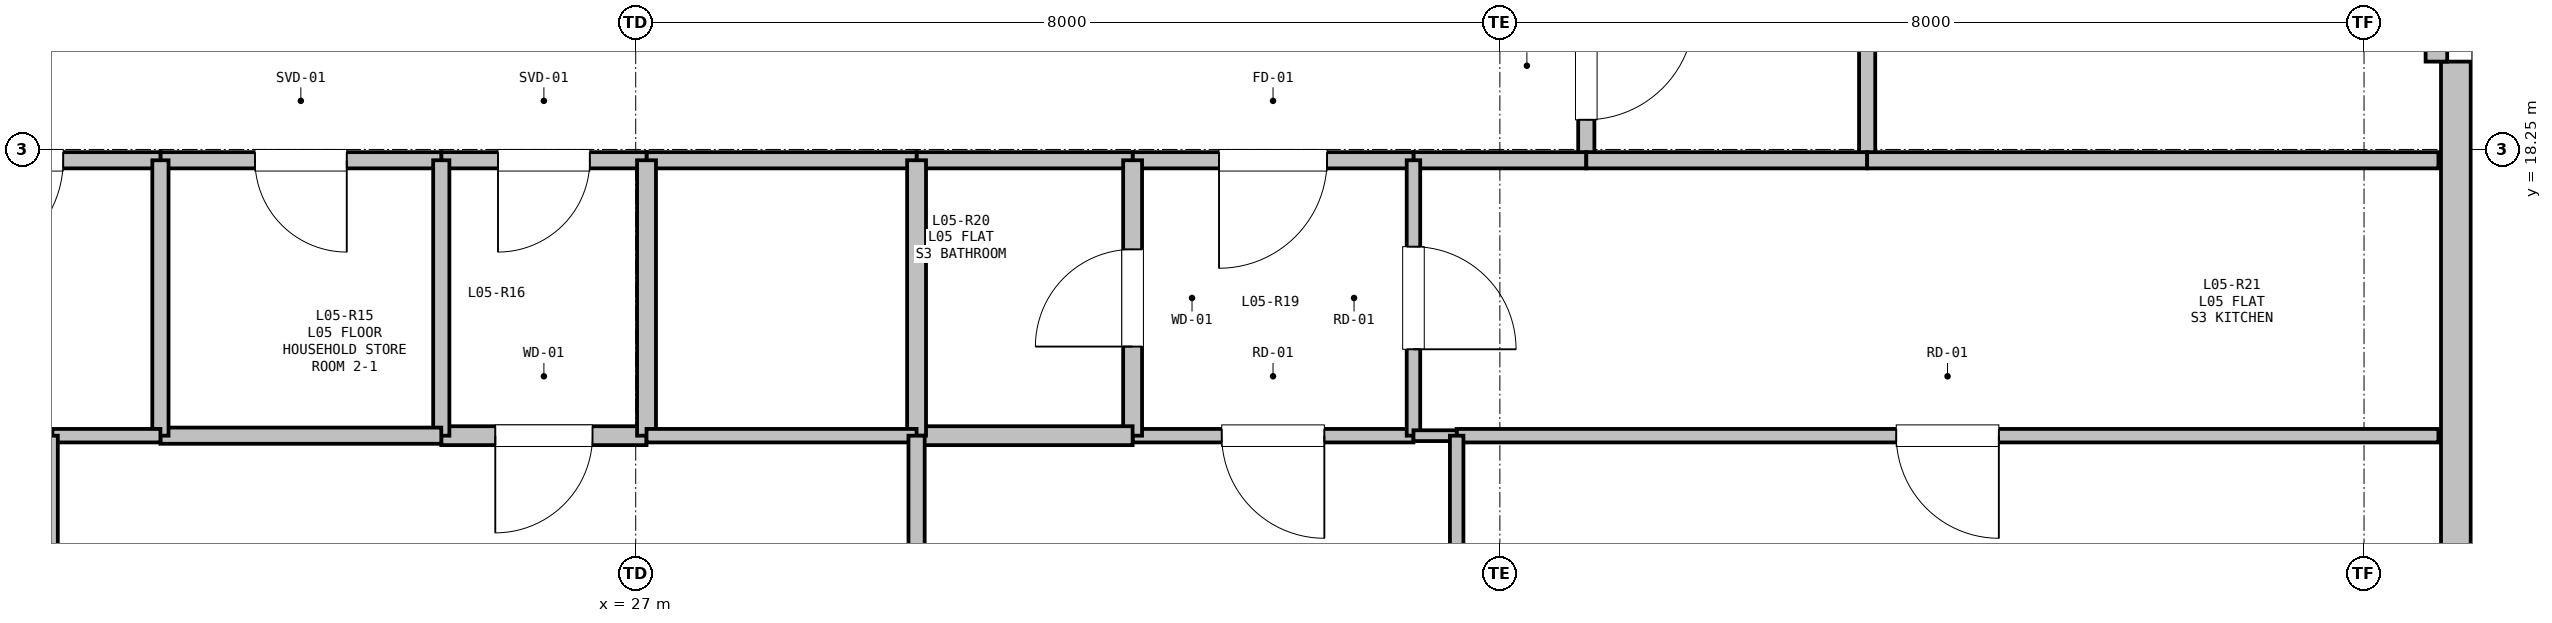
"""IFC4 building model, lengths in metres.
Left out: names, types, materials, properties, quantities, classifications, styles, units other than length and angle.
Written with IfcOpenShell. Run it as: python <this file> out.ifc"""

import sys

from ifc_helpers import new_model, si_unit, direction, frame, frame_2d, origin, place, context, subcontext, project, spatial, rectangle, extrude, element, fill, save


model = new_model("IFC4")
c1 = context("Model", 3, precision=1e-05, world=origin(), true_north=direction((0.0, 1.0)))
c2 = subcontext(c1, "Body", "Model", "MODEL_VIEW")
j1 = project(units=[si_unit("LENGTHUNIT", "METRE"), si_unit("PLANEANGLEUNIT", "RADIAN")], contexts=[c1])
p1 = place(None, origin())
s1 = spatial("IfcSite", under=j1, at=p1, CompositionType="ELEMENT")
p2 = place(p1, origin())
s2 = spatial("IfcBuilding", under=s1, at=p2, CompositionType="ELEMENT")
p3 = place(p2, frame((0.0, 0.0, 22.5)))
s3 = spatial("IfcBuildingStorey", under=s2, at=p3, CompositionType="ELEMENT", Elevation=22.5)
p4 = place(p3, frame((43.85, 19.063, 0.0), z_axis=(0.0, 0.0, 1.0), x_axis=(0.0, -1.0, 0.0)))
e1 = element("IfcWall", 1, at=p4, inside=s3, PredefinedType="SOLIDWALL", context=c2, shape_type="SweptSolid", body=[
    extrude(rectangle(XDim=12.673, YDim=0.275, at=frame_2d((6.336, 0.0))), origin(), (0.0, 0.0, 1.0), 2.66),
])
p5 = place(p3, frame((43.67, 20.763, 0.0), z_axis=(0.0, 0.0, 1.0), x_axis=(0.0, -1.0, 0.0)))
e2 = element("IfcWall", 2, at=p5, inside=s3, PredefinedType="PARAPET", context=c2, shape_type="SweptSolid", body=[
    extrude(rectangle(XDim=1.7, YDim=0.2, at=frame_2d((0.85, 0.0))), origin(), (0.0, 0.0, 1.0), 2.66),
])
p6 = place(p3, frame((26.76, 10.896, 0.0), z_axis=(0.0, 0.0, 1.0), x_axis=(-0.866027351828, 0.499996625875, 0.0)))
e3 = element("IfcWall", 3, at=p6, inside=s3, PredefinedType="PARAPET", context=c2, shape_type="SweptSolid", body=[
    extrude(rectangle(XDim=11.973, YDim=0.2, at=frame_2d((5.987, 0.0))), origin(), (0.0, 0.0, 1.0), 0.2),
])
p7 = place(p3, frame((35.8, 19.9, 0.0), z_axis=(0.0, 0.0, 1.0), x_axis=(0.0, -1.0, 0.0)))
e4 = element("IfcWall", 4, at=p7, inside=s3, PredefinedType="PARTITIONING", context=c2, shape_type="SweptSolid", body=[
    extrude(rectangle(XDim=1.75, YDim=0.15, at=frame_2d((0.875, 0.0))), origin(), (0.0, 0.0, 1.0), 3.04),
])
p8 = place(p7, frame((0.375, 0.0, 0.0)))
e5 = element("IfcOpeningElement", 5, at=p8, cuts=e4, PredefinedType="OPENING", context=c2, shape_type="SweptSolid", body=[
    extrude(rectangle(XDim=1.0, YDim=2.15, at=frame_2d((0.5, 1.075))), frame((0.0, 0.085, 0.0), z_axis=(0.0, -1.0, 0.0), x_axis=(1.0, 0.0, 0.0)), (0.0, 0.0, 1.0), 0.17),
])
p9 = place(p3, frame((35.8, 18.15, 0.0), z_axis=(0.0, 0.0, 1.0), x_axis=(-1.0, 0.0, 0.0)))
e6 = element("IfcWall", 6, at=p9, inside=s3, PredefinedType="PARTITIONING", context=c2, shape_type="SweptSolid", body=[
    extrude(rectangle(XDim=1.6, YDim=0.15, at=frame_2d((0.8, 0.0))), origin(), (0.0, 0.0, 1.0), 3.04),
])
p10 = place(p3, frame((34.2, 18.15, 0.0), z_axis=(0.0, 0.0, 1.0), x_axis=(-1.0, 0.0, 0.0)))
e7 = element("IfcWall", 7, at=p10, inside=s3, PredefinedType="PARTITIONING", context=c2, shape_type="SweptSolid", body=[
    extrude(rectangle(XDim=2.6, YDim=0.15, at=frame_2d((1.3, 0.0))), origin(), (0.0, 0.0, 1.0), 3.04),
])
p11 = place(p10, frame((0.8, 0.0, 0.0)))
e8 = element("IfcOpeningElement", 8, at=p11, cuts=e7, PredefinedType="OPENING", context=c2, shape_type="SweptSolid", body=[
    extrude(rectangle(XDim=1.0, YDim=2.15, at=frame_2d((0.5, 1.075))), frame((0.0, 0.085, 0.0), z_axis=(0.0, -1.0, 0.0), x_axis=(1.0, 0.0, 0.0)), (0.0, 0.0, 1.0), 0.17),
])
p12 = place(p3, frame((31.6, 18.15, 0.0), z_axis=(0.0, 0.0, 1.0), x_axis=(-1.0, 0.0, 0.0)))
e9 = element("IfcWall", 9, at=p12, inside=s3, PredefinedType="PARTITIONING", context=c2, shape_type="SweptSolid", body=[
    extrude(rectangle(XDim=2.0, YDim=0.15, at=frame_2d((1.0, 0.0))), origin(), (0.0, 0.0, 1.0), 3.04),
])
p13 = place(p3, frame((29.6, 18.15, 0.0), z_axis=(0.0, 0.0, 1.0), x_axis=(-1.0, 0.0, 0.0)))
e10 = element("IfcWall", 10, at=p13, inside=s3, PredefinedType="PARTITIONING", context=c2, shape_type="SweptSolid", body=[
    extrude(rectangle(XDim=2.5, YDim=0.15, at=frame_2d((1.25, 0.0))), origin(), (0.0, 0.0, 1.0), 3.04),
])
p14 = place(p3, frame((27.1, 18.15, 0.0), z_axis=(0.0, 0.0, 1.0), x_axis=(-1.0, 0.0, 0.0)))
e11 = element("IfcWall", 11, at=p14, inside=s3, PredefinedType="PARTITIONING", context=c2, shape_type="SweptSolid", body=[
    extrude(rectangle(XDim=1.9, YDim=0.15, at=frame_2d((0.95, 0.0))), origin(), (0.0, 0.0, 1.0), 3.04),
])
p15 = place(p14, frame((0.525, 0.0, 0.0)))
e12 = element("IfcOpeningElement", 12, at=p15, cuts=e11, PredefinedType="OPENING", context=c2, shape_type="SweptSolid", body=[
    extrude(rectangle(XDim=0.85, YDim=2.1, at=frame_2d((0.425, 1.05))), frame((0.0, 0.085, 0.0), z_axis=(0.0, -1.0, 0.0), x_axis=(1.0, 0.0, 0.0)), (0.0, 0.0, 1.0), 0.17),
])
p16 = place(p3, frame((25.2, 18.15, 0.0), z_axis=(0.0, 0.0, 1.0), x_axis=(-1.0, 0.0, 0.0)))
e13 = element("IfcWall", 13, at=p16, inside=s3, PredefinedType="PARTITIONING", context=c2, shape_type="SweptSolid", body=[
    extrude(rectangle(XDim=2.6, YDim=0.15, at=frame_2d((1.3, 0.0))), origin(), (0.0, 0.0, 1.0), 2.337),
])
p17 = place(p16, frame((0.875, 0.0, 0.0)))
e14 = element("IfcOpeningElement", 14, at=p17, cuts=e13, PredefinedType="OPENING", context=c2, shape_type="SweptSolid", body=[
    extrude(rectangle(XDim=0.85, YDim=2.1, at=frame_2d((0.425, 1.05))), frame((0.0, 0.085, 0.0), z_axis=(0.0, -1.0, 0.0), x_axis=(1.0, 0.0, 0.0)), (0.0, 0.0, 1.0), 0.17),
])
p18 = place(p3, frame((22.6, 18.15, 0.0), z_axis=(0.0, 0.0, 1.0), x_axis=(-1.0, 0.0, 0.0)))
e15 = element("IfcWall", 15, at=p18, inside=s3, PredefinedType="PARTITIONING", context=c2, shape_type="SweptSolid", body=[
    extrude(rectangle(XDim=2.8, YDim=0.15, at=frame_2d((1.4, 0.0))), origin(), (0.0, 0.0, 1.0), 3.04),
])
p19 = place(p18, frame((0.9, 0.0, 0.0)))
e16 = element("IfcOpeningElement", 16, at=p19, cuts=e15, PredefinedType="OPENING", context=c2, shape_type="SweptSolid", body=[
    extrude(rectangle(XDim=1.0, YDim=2.15, at=frame_2d((0.5, 1.075))), frame((0.0, 0.085, 0.0), z_axis=(0.0, -1.0, 0.0), x_axis=(1.0, 0.0, 0.0)), (0.0, 0.0, 1.0), 0.17),
])
p20 = place(p3, frame((38.4, 21.4, 0.0), z_axis=(0.0, 0.0, 1.0), x_axis=(0.0, -1.0, 0.0)))
e17 = element("IfcWall", 17, at=p20, inside=s3, PredefinedType="PARTITIONING", context=c2, shape_type="SweptSolid", body=[
    extrude(rectangle(XDim=3.25, YDim=0.15, at=frame_2d((1.625, 0.0))), origin(), (0.0, 0.0, 1.0), 3.04),
])
p21 = place(p3, frame((38.4, 18.15, 0.0), z_axis=(0.0, 0.0, 1.0), x_axis=(-1.0, 0.0, 0.0)))
e18 = element("IfcWall", 18, at=p21, inside=s3, PredefinedType="PARTITIONING", context=c2, shape_type="SweptSolid", body=[
    extrude(rectangle(XDim=2.6, YDim=0.15, at=frame_2d((1.3, 0.0))), origin(), (0.0, 0.0, 1.0), 2.337),
])
p22 = place(p3, frame((34.2, 15.6, 0.0), z_axis=(0.0, 0.0, 1.0), x_axis=(-1.0, 0.0, 0.0)))
e19 = element("IfcWall", 19, at=p22, inside=s3, PredefinedType="PARTITIONING", context=c2, shape_type="SweptSolid", body=[
    extrude(rectangle(XDim=2.6, YDim=0.125, at=frame_2d((1.3, 0.0))), origin(), (0.0, 0.0, 1.0), 3.04),
])
p23 = place(p22, frame((0.825, 0.0, 0.0)))
e20 = element("IfcOpeningElement", 20, at=p23, cuts=e19, PredefinedType="OPENING", context=c2, shape_type="SweptSolid", body=[
    extrude(rectangle(XDim=0.95, YDim=2.1, at=frame_2d((0.475, 1.05))), frame((0.0, 0.073, 0.0), z_axis=(0.0, -1.0, 0.0), x_axis=(1.0, 0.0, 0.0)), (0.0, 0.0, 1.0), 0.145),
])
p24 = place(p3, frame((31.6, 15.6, 0.0), z_axis=(0.0, 0.0, 1.0), x_axis=(0.0, 1.0, 0.0)))
e21 = element("IfcWall", 21, at=p24, inside=s3, PredefinedType="PLUMBINGWALL", context=c2, shape_type="SweptSolid", body=[
    extrude(rectangle(XDim=2.55, YDim=0.175, at=frame_2d((1.275, 0.0))), origin(), (0.0, 0.0, 1.0), 3.04),
])
p25 = place(p24, frame((0.825, 0.0, 0.0)))
e22 = element("IfcOpeningElement", 22, at=p25, cuts=e21, PredefinedType="OPENING", context=c2, shape_type="SweptSolid", body=[
    extrude(rectangle(XDim=0.9, YDim=2.1, at=frame_2d((0.45, 1.05))), frame((0.0, 0.097, 0.0), z_axis=(0.0, -1.0, 0.0), x_axis=(1.0, 0.0, 0.0)), (0.0, 0.0, 1.0), 0.195),
])
p26 = place(p3, frame((34.2, 18.15, 0.0), z_axis=(0.0, 0.0, 1.0), x_axis=(0.0, -1.0, 0.0)))
e23 = element("IfcWall", 23, at=p26, inside=s3, PredefinedType="PARTITIONING", context=c2, shape_type="SweptSolid", body=[
    extrude(rectangle(XDim=2.55, YDim=0.125, at=frame_2d((1.275, 0.0))), origin(), (0.0, 0.0, 1.0), 3.04),
])
p27 = place(p26, frame((0.8, 0.0, 0.0)))
e24 = element("IfcOpeningElement", 24, at=p27, cuts=e23, PredefinedType="OPENING", context=c2, shape_type="SweptSolid", body=[
    extrude(rectangle(XDim=0.95, YDim=2.1, at=frame_2d((0.475, 1.05))), frame((0.0, 0.073, 0.0), z_axis=(0.0, -1.0, 0.0), x_axis=(1.0, 0.0, 0.0)), (0.0, 0.0, 1.0), 0.145),
])
p28 = place(p3, frame((27.1, 15.6, 0.0), z_axis=(0.0, 0.0, 1.0), x_axis=(-1.0, 0.0, 0.0)))
e25 = element("IfcWall", 25, at=p28, inside=s3, PredefinedType="PLUMBINGWALL", context=c2, shape_type="SweptSolid", body=[
    extrude(rectangle(XDim=1.9, YDim=0.175, at=frame_2d((0.95, 0.0))), origin(), (0.0, 0.0, 1.0), 2.337),
])
p29 = place(p28, frame((0.5, 0.0, 0.0)))
e26 = element("IfcOpeningElement", 26, at=p29, cuts=e25, PredefinedType="OPENING", context=c2, shape_type="SweptSolid", body=[
    extrude(rectangle(XDim=0.9, YDim=2.1, at=frame_2d((0.45, 1.05))), frame((0.0, 0.097, 0.0), z_axis=(0.0, -1.0, 0.0), x_axis=(1.0, 0.0, 0.0)), (0.0, 0.0, 1.0), 0.195),
])
p30 = place(p3, frame((25.2, 15.6, 0.0), z_axis=(0.0, 0.0, 1.0), x_axis=(0.0, 1.0, 0.0)))
e27 = element("IfcWall", 27, at=p30, inside=s3, PredefinedType="PARTITIONING", context=c2, shape_type="SweptSolid", body=[
    extrude(rectangle(XDim=2.55, YDim=0.15, at=frame_2d((1.275, 0.0))), origin(), (0.0, 0.0, 1.0), 2.337),
])
p31 = place(p3, frame((27.1, 18.15, 0.0), z_axis=(0.0, 0.0, 1.0), x_axis=(0.0, -1.0, 0.0)))
e28 = element("IfcWall", 28, at=p31, inside=s3, PredefinedType="PLUMBINGWALL", context=c2, shape_type="SweptSolid", body=[
    extrude(rectangle(XDim=2.55, YDim=0.175, at=frame_2d((1.275, 0.0))), origin(), (0.0, 0.0, 1.0), 3.04),
])
p32 = place(p3, frame((31.6, 15.6, 0.0), z_axis=(0.0, 0.0, 1.0), x_axis=(-1.0, 0.0, 0.0)))
e29 = element("IfcWall", 29, at=p32, inside=s3, PredefinedType="PLUMBINGWALL", context=c2, shape_type="SweptSolid", body=[
    extrude(rectangle(XDim=2.0, YDim=0.175, at=frame_2d((1.0, 0.0))), origin(), (0.0, 0.0, 1.0), 3.04),
])
p33 = place(p3, frame((29.6, 15.6, 0.0), z_axis=(0.0, 0.0, 1.0), x_axis=(0.0, 1.0, 0.0)))
e30 = element("IfcWall", 30, at=p33, inside=s3, PredefinedType="PLUMBINGWALL", context=c2, shape_type="SweptSolid", body=[
    extrude(rectangle(XDim=2.55, YDim=0.175, at=frame_2d((1.275, 0.0))), origin(), (0.0, 0.0, 1.0), 3.04),
])
p34 = place(p3, frame((38.4, 18.15, 0.0), z_axis=(0.0, 0.0, 1.0), x_axis=(1.0, 0.0, 0.0)))
e31 = element("IfcWall", 31, at=p34, inside=s3, PredefinedType="PARTITIONING", context=c2, shape_type="SweptSolid", body=[
    extrude(rectangle(XDim=5.289, YDim=0.15, at=frame_2d((2.644, 0.0))), origin(), (0.0, 0.0, 1.0), 2.365),
])
p35 = place(p3, frame((43.688, 15.6, 0.0), z_axis=(0.0, 0.0, 1.0), x_axis=(-1.0, 0.0, 0.0)))
e32 = element("IfcWall", 32, at=p35, inside=s3, PredefinedType="PARTITIONING", context=c2, shape_type="SweptSolid", body=[
    extrude(rectangle(XDim=9.088, YDim=0.125, at=frame_2d((4.544, 0.0))), origin(), (0.0, 0.0, 1.0), 2.337),
])
p36 = place(p35, frame((4.069, 0.0, 0.0)))
e33 = element("IfcOpeningElement", 33, at=p36, cuts=e32, PredefinedType="OPENING", context=c2, shape_type="SweptSolid", body=[
    extrude(rectangle(XDim=0.95, YDim=2.1, at=frame_2d((0.475, 1.05))), frame((0.0, 0.073, 0.0), z_axis=(0.0, -1.0, 0.0), x_axis=(1.0, 0.0, 0.0)), (0.0, 0.0, 1.0), 0.145),
])
p37 = place(p3, frame((34.6, 15.6, 0.0), z_axis=(0.0, 0.0, 1.0), x_axis=(-1.0, 0.0, 0.0)))
e34 = element("IfcWall", 34, at=p37, inside=s3, PredefinedType="PARTITIONING", context=c2, shape_type="SweptSolid", body=[
    extrude(rectangle(XDim=0.4, YDim=0.1, at=frame_2d((0.2, 0.0))), origin(), (0.0, 0.0, 1.0), 3.04),
])
p38 = place(p3, frame((25.2, 15.6, 0.0), z_axis=(0.0, 0.0, 1.0), x_axis=(-1.0, 0.0, 0.0)))
e35 = element("IfcWall", 35, at=p38, inside=s3, PredefinedType="PARTITIONING", context=c2, shape_type="SweptSolid", body=[
    extrude(rectangle(XDim=2.6, YDim=0.15, at=frame_2d((1.3, 0.0))), origin(), (0.0, 0.0, 1.0), 3.04),
])
p39 = place(p3, frame((22.6, 15.6, 0.0), z_axis=(0.0, 0.0, 1.0), x_axis=(0.0, 1.0, 0.0)))
e36 = element("IfcWall", 36, at=p39, inside=s3, PredefinedType="PARTITIONING", context=c2, shape_type="SweptSolid", body=[
    extrude(rectangle(XDim=2.55, YDim=0.15, at=frame_2d((1.275, 0.0))), origin(), (0.0, 0.0, 1.0), 3.04),
])
p40 = place(p3, frame((22.6, 15.6, 0.0), z_axis=(0.0, 0.0, 1.0), x_axis=(-1.0, 0.0, 0.0)))
e37 = element("IfcWall", 37, at=p40, inside=s3, PredefinedType="PARTITIONING", context=c2, shape_type="SweptSolid", body=[
    extrude(rectangle(XDim=1.0, YDim=0.125, at=frame_2d((0.5, 0.0))), origin(), (0.0, 0.0, 1.0), 3.04),
])
p41 = place(p3, frame((21.6, 15.6, 0.0), z_axis=(0.0, 0.0, 1.0), x_axis=(0.0, -1.0, 0.0)))
e38 = element("IfcWall", 38, at=p41, inside=s3, PredefinedType="PARTITIONING", context=c2, shape_type="SweptSolid", body=[
    extrude(rectangle(XDim=1.684, YDim=0.1, at=frame_2d((0.842, 0.0))), origin(), (0.0, 0.0, 1.0), 2.365),
])
p42 = place(p3, frame((27.1, 15.6, 0.0), z_axis=(0.0, 0.0, 1.0), x_axis=(1.0, 0.0, 0.0)))
e39 = element("IfcWall", 39, at=p42, inside=s3, PredefinedType="PARTITIONING", context=c2, shape_type="SweptSolid", body=[
    extrude(rectangle(XDim=2.5, YDim=0.125, at=frame_2d((1.25, 0.0))), origin(), (0.0, 0.0, 1.0), 3.04),
])
p43 = place(p3, frame((29.6, 15.6, 0.0), z_axis=(0.0, 0.0, 1.0), x_axis=(0.0, -1.0, 0.0)))
e40 = element("IfcWall", 40, at=p43, inside=s3, PredefinedType="PARTITIONING", context=c2, shape_type="SweptSolid", body=[
    extrude(rectangle(XDim=6.157, YDim=0.15, at=frame_2d((3.079, 0.0))), origin(), (0.0, 0.0, 1.0), 2.337),
])
p44 = place(p3, frame((34.6, 15.6, 0.0), z_axis=(0.0, 0.0, 1.0), x_axis=(0.0, -1.0, 0.0)))
e41 = element("IfcWall", 41, at=p44, inside=s3, PredefinedType="PARTITIONING", context=c2, shape_type="SweptSolid", body=[
    extrude(rectangle(XDim=5.98, YDim=0.125, at=frame_2d((2.99, 0.0))), origin(), (0.0, 0.0, 1.0), 3.04),
])
p45 = place(p44, frame((2.515, 0.0, 0.0)))
e42 = element("IfcOpeningElement", 42, at=p45, cuts=e41, PredefinedType="OPENING", context=c2, shape_type="SweptSolid", body=[
    extrude(rectangle(XDim=0.95, YDim=2.1, at=frame_2d((0.475, 1.05))), frame((0.0, 0.073, 0.0), z_axis=(0.0, -1.0, 0.0), x_axis=(1.0, 0.0, 0.0)), (0.0, 0.0, 1.0), 0.145),
])
p46 = place(p8, origin())
e43 = element("IfcDoor", 43, at=p46, inside=s3, OperationType="SINGLE_SWING_LEFT", PredefinedType="DOOR", context=c2, shape_type="SweptSolid", body=[
    extrude(rectangle(XDim=1.0, YDim=2.15, at=frame_2d((0.5, 1.075))), frame((0.0, 0.025, 0.0), z_axis=(0.0, -1.0, 0.0), x_axis=(1.0, 0.0, 0.0)), (0.0, 0.0, 1.0), 0.05),
])
fill(e5, e43)
p47 = place(p11, origin())
e44 = element("IfcDoor", 44, at=p47, inside=s3, OperationType="SINGLE_SWING_RIGHT", PredefinedType="DOOR", context=c2, shape_type="SweptSolid", body=[
    extrude(rectangle(XDim=1.0, YDim=2.15, at=frame_2d((0.5, 1.075))), frame((0.0, 0.025, 0.0), z_axis=(0.0, -1.0, 0.0), x_axis=(1.0, 0.0, 0.0)), (0.0, 0.0, 1.0), 0.05),
])
fill(e8, e44)
p48 = place(p15, origin())
e45 = element("IfcDoor", 45, at=p48, inside=s3, OperationType="SINGLE_SWING_RIGHT", PredefinedType="DOOR", context=c2, shape_type="SweptSolid", body=[
    extrude(rectangle(XDim=0.85, YDim=2.1, at=frame_2d((0.425, 1.05))), frame((0.0, 0.025, 0.0), z_axis=(0.0, -1.0, 0.0), x_axis=(1.0, 0.0, 0.0)), (0.0, 0.0, 1.0), 0.05),
])
fill(e12, e45)
p49 = place(p17, origin())
e46 = element("IfcDoor", 46, at=p49, inside=s3, OperationType="SINGLE_SWING_LEFT", PredefinedType="DOOR", context=c2, shape_type="SweptSolid", body=[
    extrude(rectangle(XDim=0.85, YDim=2.1, at=frame_2d((0.425, 1.05))), frame((0.0, 0.025, 0.0), z_axis=(0.0, -1.0, 0.0), x_axis=(1.0, 0.0, 0.0)), (0.0, 0.0, 1.0), 0.05),
])
fill(e14, e46)
p50 = place(p19, origin())
e47 = element("IfcDoor", 47, at=p50, inside=s3, OperationType="SINGLE_SWING_RIGHT", PredefinedType="DOOR", context=c2, shape_type="SweptSolid", body=[
    extrude(rectangle(XDim=1.0, YDim=2.15, at=frame_2d((0.5, 1.075))), frame((0.0, 0.025, 0.0), z_axis=(0.0, -1.0, 0.0), x_axis=(1.0, 0.0, 0.0)), (0.0, 0.0, 1.0), 0.05),
])
fill(e16, e47)
p51 = place(p25, origin())
e48 = element("IfcDoor", 48, at=p51, inside=s3, OperationType="SINGLE_SWING_LEFT", PredefinedType="DOOR", context=c2, shape_type="SweptSolid", body=[
    extrude(rectangle(XDim=0.9, YDim=2.1, at=frame_2d((0.45, 1.05))), frame((0.0, 0.025, 0.0), z_axis=(0.0, -1.0, 0.0), x_axis=(1.0, 0.0, 0.0)), (0.0, 0.0, 1.0), 0.05),
])
fill(e22, e48)
p52 = place(p27, origin())
e49 = element("IfcDoor", 49, at=p52, inside=s3, OperationType="SINGLE_SWING_RIGHT", PredefinedType="DOOR", context=c2, shape_type="SweptSolid", body=[
    extrude(rectangle(XDim=0.95, YDim=2.1, at=frame_2d((0.475, 1.05))), frame((0.0, 0.025, 0.0), z_axis=(0.0, -1.0, 0.0), x_axis=(1.0, 0.0, 0.0)), (0.0, 0.0, 1.0), 0.05),
])
fill(e24, e49)
p53 = place(p23, origin())
e50 = element("IfcDoor", 50, at=p53, inside=s3, OperationType="SINGLE_SWING_LEFT", PredefinedType="DOOR", context=c2, shape_type="SweptSolid", body=[
    extrude(rectangle(XDim=0.95, YDim=2.1, at=frame_2d((0.475, 1.05))), frame((0.0, 0.025, 0.0), z_axis=(0.0, -1.0, 0.0), x_axis=(1.0, 0.0, 0.0)), (0.0, 0.0, 1.0), 0.05),
])
fill(e20, e50)
p54 = place(p36, origin())
e51 = element("IfcDoor", 51, at=p54, inside=s3, OperationType="SINGLE_SWING_LEFT", PredefinedType="DOOR", context=c2, shape_type="SweptSolid", body=[
    extrude(rectangle(XDim=0.95, YDim=2.1, at=frame_2d((0.475, 1.05))), frame((0.0, 0.025, 0.0), z_axis=(0.0, -1.0, 0.0), x_axis=(1.0, 0.0, 0.0)), (0.0, 0.0, 1.0), 0.05),
])
fill(e33, e51)
p55 = place(p29, origin())
e52 = element("IfcDoor", 52, at=p55, inside=s3, OperationType="SINGLE_SWING_RIGHT", PredefinedType="DOOR", context=c2, shape_type="SweptSolid", body=[
    extrude(rectangle(XDim=0.9, YDim=2.1, at=frame_2d((0.45, 1.05))), frame((0.0, 0.025, 0.0), z_axis=(0.0, -1.0, 0.0), x_axis=(1.0, 0.0, 0.0)), (0.0, 0.0, 1.0), 0.05),
])
fill(e26, e52)
save(model, sys.argv[1])
